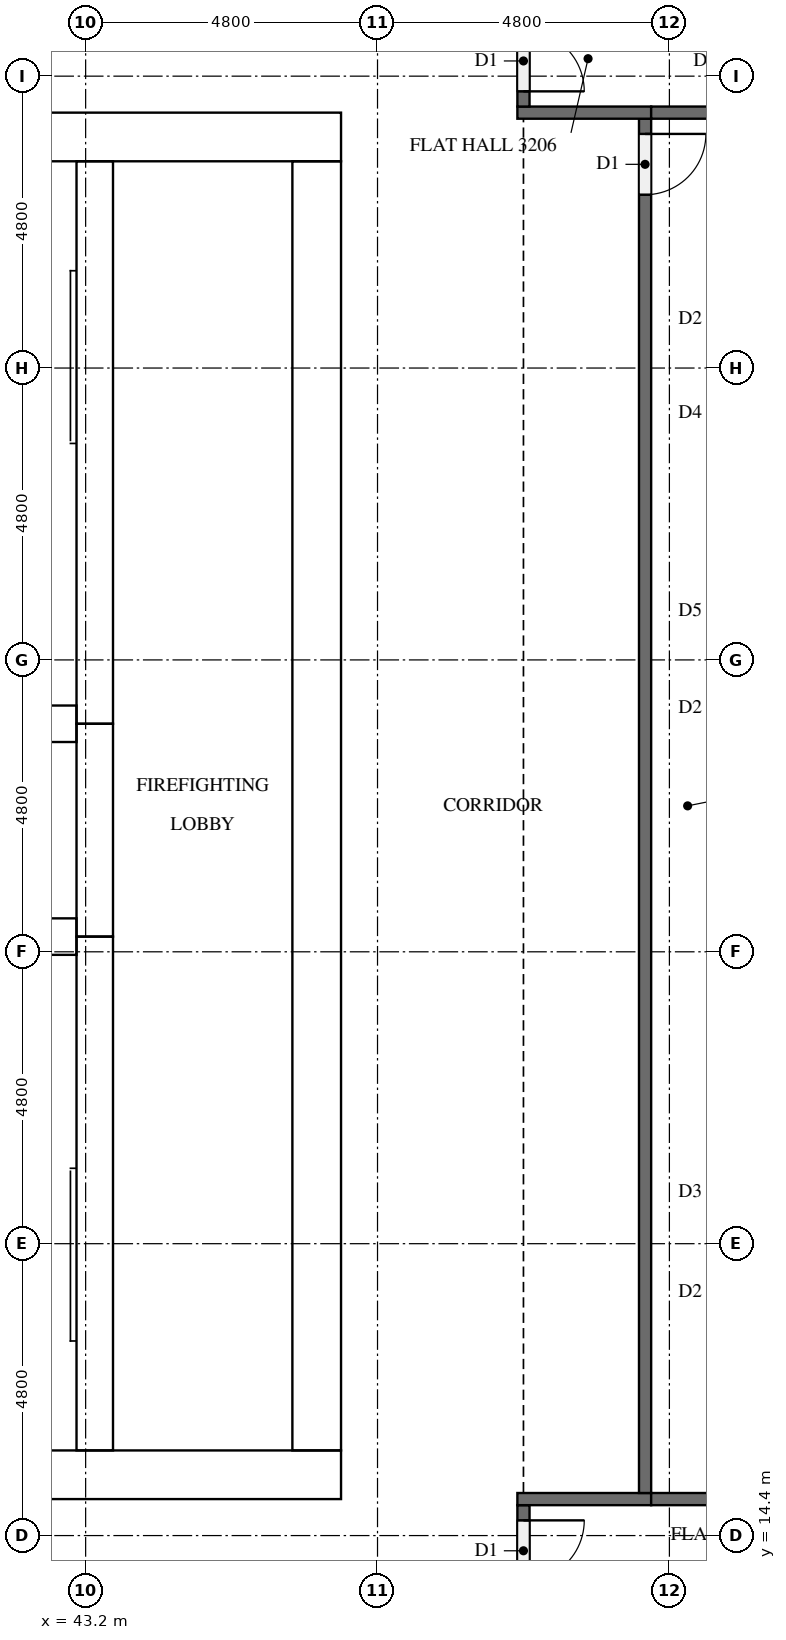
"""IFC4 building model, lengths in metres.
Left out: names, types, materials, properties, quantities, classifications, styles, units other than length and angle.
Written with IfcOpenShell. Run it as: python <this file> out.ifc"""

import sys

from ifc_helpers import new_model, si_unit, direction, frame, frame_2d, origin, place, context, subcontext, project, spatial, rectangle, extrude, element, fill, save


model = new_model("IFC4")
c1 = context("Model", 3, precision=1e-05, world=origin(), true_north=direction((0.0, 1.0)))
c2 = subcontext(c1, "Body", "Model", "MODEL_VIEW")
j1 = project(units=[si_unit("LENGTHUNIT", "METRE"), si_unit("PLANEANGLEUNIT", "RADIAN")], contexts=[c1])
p1 = place(None, origin())
s1 = spatial("IfcSite", under=j1, at=p1, CompositionType="ELEMENT")
p2 = place(p1, origin())
s2 = spatial("IfcBuilding", under=s1, at=p2, CompositionType="ELEMENT")
p3 = place(p2, frame((0.0, 0.0, 126.1)))
s3 = spatial("IfcBuildingStorey", under=s2, at=p3, CompositionType="ELEMENT", Elevation=126.1)
p4 = place(p3, frame((15.0, 15.4, 0.0), z_axis=(0.0, 0.0, 1.0), x_axis=(1.0, 0.0, 0.0)))
e1 = element("IfcWall", 1, at=p4, inside=s3, PredefinedType="SHEAR", context=c2, shape_type="SweptSolid", body=[
    extrude(rectangle(XDim=32.4, YDim=0.8, at=frame_2d((16.2, 0.0))), origin(), (0.0, 0.0, 1.0), 3.2),
])
p5 = place(p4, frame((15.3, 0.0, 0.0)))
e2 = element("IfcOpeningElement", 2, at=p5, cuts=e1, PredefinedType="OPENING", context=c2, shape_type="SweptSolid", body=[
    extrude(rectangle(XDim=1.8, YDim=2.1, at=frame_2d((0.9, 1.05))), frame((0.0, 0.41, 0.0), z_axis=(0.0, -1.0, 0.0), x_axis=(1.0, 0.0, 0.0)), (0.0, 0.0, 1.0), 0.82),
])
p6 = place(p3, frame((15.0, 37.4, 0.0), z_axis=(0.0, 0.0, 1.0), x_axis=(1.0, 0.0, 0.0)))
e3 = element("IfcWall", 3, at=p6, inside=s3, PredefinedType="SHEAR", context=c2, shape_type="SweptSolid", body=[
    extrude(rectangle(XDim=32.4, YDim=0.8, at=frame_2d((16.2, 0.0))), origin(), (0.0, 0.0, 1.0), 3.2),
])
p7 = place(p6, frame((15.3, 0.0, 0.0)))
e4 = element("IfcOpeningElement", 4, at=p7, cuts=e3, PredefinedType="OPENING", context=c2, shape_type="SweptSolid", body=[
    extrude(rectangle(XDim=1.8, YDim=2.1, at=frame_2d((0.9, 1.05))), frame((0.0, 0.41, 0.0), z_axis=(0.0, -1.0, 0.0), x_axis=(1.0, 0.0, 0.0)), (0.0, 0.0, 1.0), 0.82),
])
p8 = place(p6, frame((1.51, 0.0, 0.0)))
e5 = element("IfcOpeningElement", 5, at=p8, cuts=e3, PredefinedType="OPENING", context=c2, shape_type="SweptSolid", body=[
    extrude(rectangle(XDim=1.0, YDim=2.1, at=frame_2d((0.5, 1.05))), frame((0.0, 0.41, 0.0), z_axis=(0.0, -1.0, 0.0), x_axis=(1.0, 0.0, 0.0)), (0.0, 0.0, 1.0), 0.82),
])
p9 = place(p6, frame((5.11, 0.0, 0.0)))
e6 = element("IfcOpeningElement", 6, at=p9, cuts=e3, PredefinedType="OPENING", context=c2, shape_type="SweptSolid", body=[
    extrude(rectangle(XDim=1.0, YDim=2.1, at=frame_2d((0.5, 1.05))), frame((0.0, 0.41, 0.0), z_axis=(0.0, -1.0, 0.0), x_axis=(1.0, 0.0, 0.0)), (0.0, 0.0, 1.0), 0.82),
])
p10 = place(p3, frame((47.0, 15.8, 0.0), z_axis=(0.0, 0.0, 1.0), x_axis=(0.0, 1.0, 0.0)))
e7 = element("IfcWall", 7, at=p10, inside=s3, PredefinedType="SHEAR", context=c2, shape_type="SweptSolid", body=[
    extrude(rectangle(XDim=21.2, YDim=0.8, at=frame_2d((10.6, 0.0))), origin(), (0.0, 0.0, 1.0), 3.2),
])
p11 = place(p10, frame((10.3, 0.0, 0.0)))
e8 = element("IfcOpeningElement", 8, at=p11, cuts=e7, PredefinedType="OPENING", context=c2, shape_type="SweptSolid", body=[
    extrude(rectangle(XDim=1.2, YDim=2.1, at=frame_2d((0.6, 1.05))), frame((0.0, 0.41, 0.0), z_axis=(0.0, -1.0, 0.0), x_axis=(1.0, 0.0, 0.0)), (0.0, 0.0, 1.0), 0.82),
])
p12 = place(p3, frame((43.35, 15.8, 0.0), z_axis=(0.0, 0.0, 1.0), x_axis=(0.0, 1.0, 0.0)))
e9 = element("IfcWall", 9, at=p12, inside=s3, PredefinedType="SHEAR", context=c2, shape_type="SweptSolid", body=[
    extrude(rectangle(XDim=8.45, YDim=0.6, at=frame_2d((4.225, 0.0))), origin(), (0.0, 0.0, 1.0), 3.2),
])
p13 = place(p12, frame((0.4, 0.0, 0.0)))
e10 = element("IfcOpeningElement", 10, at=p13, cuts=e9, PredefinedType="OPENING", context=c2, shape_type="SweptSolid", body=[
    extrude(rectangle(XDim=1.2, YDim=2.1, at=frame_2d((0.6, 1.05))), frame((0.0, 0.31, 0.0), z_axis=(0.0, -1.0, 0.0), x_axis=(1.0, 0.0, 0.0)), (0.0, 0.0, 1.0), 0.62),
])
p14 = place(p3, frame((43.35, 24.25, 0.0), z_axis=(0.0, 0.0, 1.0), x_axis=(0.0, 1.0, 0.0)))
e11 = element("IfcWall", 11, at=p14, inside=s3, PredefinedType="SHEAR", context=c2, shape_type="SweptSolid", body=[
    extrude(rectangle(XDim=3.5, YDim=0.6, at=frame_2d((1.75, 0.0))), origin(), (0.0, 0.0, 1.0), 3.2),
])
p15 = place(p14, frame((1.2, 0.0, 0.0)))
e12 = element("IfcOpeningElement", 12, at=p15, cuts=e11, PredefinedType="OPENING", context=c2, shape_type="SweptSolid", body=[
    extrude(rectangle(XDim=1.1, YDim=2.1, at=frame_2d((0.55, 1.05))), frame((0.0, 0.31, 0.0), z_axis=(0.0, -1.0, 0.0), x_axis=(1.0, 0.0, 0.0)), (0.0, 0.0, 1.0), 0.62),
])
p16 = place(p3, frame((43.35, 27.75, 0.0), z_axis=(0.0, 0.0, 1.0), x_axis=(0.0, 1.0, 0.0)))
e13 = element("IfcWall", 13, at=p16, inside=s3, PredefinedType="SHEAR", context=c2, shape_type="SweptSolid", body=[
    extrude(rectangle(XDim=9.25, YDim=0.6, at=frame_2d((4.625, 0.0))), origin(), (0.0, 0.0, 1.0), 3.2),
])
p17 = place(p16, frame((7.65, 0.0, 0.0)))
e14 = element("IfcOpeningElement", 14, at=p17, cuts=e13, PredefinedType="OPENING", context=c2, shape_type="SweptSolid", body=[
    extrude(rectangle(XDim=1.2, YDim=2.1, at=frame_2d((0.6, 1.05))), frame((0.0, 0.31, 0.0), z_axis=(0.0, -1.0, 0.0), x_axis=(1.0, 0.0, 0.0)), (0.0, 0.0, 1.0), 0.62),
])
for number, where, z_axis, x_axis in (
    (15, (39.6, 24.25, 0.0), (0.0, 0.0, 1.0), (1.0, 0.0, 0.0)),
    (16, (39.6, 27.75, 0.0), (0.0, 0.0, 1.0), (1.0, 0.0, 0.0)),
):
    element("IfcWall", number, at=place(p3, frame(where, z_axis=z_axis, x_axis=x_axis)), inside=s3, PredefinedType="SHEAR", context=c2, shape_type="SweptSolid", body=[
        extrude(rectangle(XDim=3.45, YDim=0.6, at=frame_2d((1.725, 0.0))), origin(), (0.0, 0.0, 1.0), 3.2),
    ])
p18 = place(p3, frame((50.4, 14.9, 0.0), z_axis=(0.0, 0.0, 1.0), x_axis=(0.0, -1.0, 0.0)))
e17 = element("IfcWall", 17, at=p18, inside=s3, PredefinedType="PARTITIONING", context=c2, shape_type="SweptSolid", body=[
    extrude(rectangle(XDim=2.8, YDim=0.2, at=frame_2d((1.4, 0.0))), origin(), (0.0, 0.0, 1.0), 3.2),
])
p19 = place(p18, frame((0.25, 0.0, 0.0)))
e18 = element("IfcOpeningElement", 18, at=p19, cuts=e17, PredefinedType="OPENING", context=c2, shape_type="SweptSolid", body=[
    extrude(rectangle(XDim=1.0, YDim=2.1, at=frame_2d((0.5, 1.05))), frame((0.0, 0.11, 0.0), z_axis=(0.0, -1.0, 0.0), x_axis=(1.0, 0.0, 0.0)), (0.0, 0.0, 1.0), 0.22),
])
p20 = place(p3, frame((50.3, 15.0, 0.0), z_axis=(0.0, 0.0, 1.0), x_axis=(1.0, 0.0, 0.0)))
e19 = element("IfcWall", 19, at=p20, inside=s3, PredefinedType="PARTITIONING", context=c2, shape_type="SweptSolid", body=[
    extrude(rectangle(XDim=2.2, YDim=0.2, at=frame_2d((1.1, 0.0))), origin(), (0.0, 0.0, 1.0), 3.2),
])
p21 = place(p3, frame((52.4, 37.7, 0.0), z_axis=(0.0, 0.0, 1.0), x_axis=(0.0, -1.0, 0.0)))
e20 = element("IfcWall", 20, at=p21, inside=s3, PredefinedType="PARTITIONING", context=c2, shape_type="SweptSolid", body=[
    extrude(rectangle(XDim=22.6, YDim=0.2, at=frame_2d((11.3, 0.0))), origin(), (0.0, 0.0, 1.0), 3.2),
])
p22 = place(p21, frame((0.25, 0.0, 0.0)))
e21 = element("IfcOpeningElement", 21, at=p22, cuts=e20, PredefinedType="OPENING", context=c2, shape_type="SweptSolid", body=[
    extrude(rectangle(XDim=1.0, YDim=2.1, at=frame_2d((0.5, 1.05))), frame((0.0, 0.11, 0.0), z_axis=(0.0, -1.0, 0.0), x_axis=(1.0, 0.0, 0.0)), (0.0, 0.0, 1.0), 0.22),
])
p23 = place(p3, frame((52.5, 37.8, 0.0), z_axis=(0.0, 0.0, 1.0), x_axis=(-1.0, 0.0, 0.0)))
e22 = element("IfcWall", 22, at=p23, inside=s3, PredefinedType="PARTITIONING", context=c2, shape_type="SweptSolid", body=[
    extrude(rectangle(XDim=2.2, YDim=0.2, at=frame_2d((1.1, 0.0))), origin(), (0.0, 0.0, 1.0), 3.2),
])
p24 = place(p3, frame((50.4, 40.7, 0.0), z_axis=(0.0, 0.0, 1.0), x_axis=(0.0, -1.0, 0.0)))
e23 = element("IfcWall", 23, at=p24, inside=s3, PredefinedType="PARTITIONING", context=c2, shape_type="SweptSolid", body=[
    extrude(rectangle(XDim=2.8, YDim=0.2, at=frame_2d((1.4, 0.0))), origin(), (0.0, 0.0, 1.0), 3.2),
])
p25 = place(p24, frame((1.55, 0.0, 0.0)))
e24 = element("IfcOpeningElement", 24, at=p25, cuts=e23, PredefinedType="OPENING", context=c2, shape_type="SweptSolid", body=[
    extrude(rectangle(XDim=1.0, YDim=2.1, at=frame_2d((0.5, 1.05))), frame((0.0, 0.11, 0.0), z_axis=(0.0, -1.0, 0.0), x_axis=(1.0, 0.0, 0.0)), (0.0, 0.0, 1.0), 0.22),
])
p26 = place(p3, frame((52.5, 15.0, 0.0), z_axis=(0.0, 0.0, 1.0), x_axis=(1.0, 0.0, 0.0)))
e25 = element("IfcWall", 25, at=p26, inside=s3, PredefinedType="PARTITIONING", context=c2, shape_type="SweptSolid", body=[
    extrude(rectangle(XDim=5.0, YDim=0.2, at=frame_2d((2.5, 0.0))), origin(), (0.0, 0.0, 1.0), 3.2),
])
p27 = place(p3, frame((52.5, 37.8, 0.0), z_axis=(0.0, 0.0, 1.0), x_axis=(1.0, 0.0, 0.0)))
e26 = element("IfcWall", 26, at=p27, inside=s3, PredefinedType="PARTITIONING", context=c2, shape_type="SweptSolid", body=[
    extrude(rectangle(XDim=4.725, YDim=0.2, at=frame_2d((2.363, 0.0))), origin(), (0.0, 0.0, 1.0), 3.2),
])
p28 = place(p15, origin())
e27 = element("IfcDoor", 27, at=p28, inside=s3, OperationType="DOUBLE_DOOR_SLIDING", PredefinedType="DOOR", context=c2, shape_type="SweptSolid", body=[
    extrude(rectangle(XDim=1.1, YDim=2.1, at=frame_2d((0.55, 1.05))), frame((0.0, 0.025, 0.0), z_axis=(0.0, -1.0, 0.0), x_axis=(1.0, 0.0, 0.0)), (0.0, 0.0, 1.0), 0.05),
])
fill(e12, e27)
p29 = place(p13, origin())
e28 = element("IfcDoor", 28, at=p29, inside=s3, OperationType="SINGLE_SWING_LEFT", PredefinedType="DOOR", context=c2, shape_type="SweptSolid", body=[
    extrude(rectangle(XDim=1.2, YDim=2.1, at=frame_2d((0.6, 1.05))), frame((0.0, 0.025, 0.0), z_axis=(0.0, -1.0, 0.0), x_axis=(1.0, 0.0, 0.0)), (0.0, 0.0, 1.0), 0.05),
])
fill(e10, e28)
p30 = place(p17, origin())
e29 = element("IfcDoor", 29, at=p30, inside=s3, OperationType="SINGLE_SWING_RIGHT", PredefinedType="DOOR", context=c2, shape_type="SweptSolid", body=[
    extrude(rectangle(XDim=1.2, YDim=2.1, at=frame_2d((0.6, 1.05))), frame((0.0, 0.025, 0.0), z_axis=(0.0, -1.0, 0.0), x_axis=(1.0, 0.0, 0.0)), (0.0, 0.0, 1.0), 0.05),
])
fill(e14, e29)
p31 = place(p11, origin())
e30 = element("IfcDoor", 30, at=p31, inside=s3, OperationType="SINGLE_SWING_RIGHT", PredefinedType="DOOR", context=c2, shape_type="SweptSolid", body=[
    extrude(rectangle(XDim=1.2, YDim=2.1, at=frame_2d((0.6, 1.05))), frame((0.0, 0.025, 0.0), z_axis=(0.0, -1.0, 0.0), x_axis=(1.0, 0.0, 0.0)), (0.0, 0.0, 1.0), 0.05),
])
fill(e8, e30)
p32 = place(p19, origin())
e31 = element("IfcDoor", 31, at=p32, inside=s3, OperationType="SINGLE_SWING_LEFT", PredefinedType="DOOR", context=c2, shape_type="SweptSolid", body=[
    extrude(rectangle(XDim=1.0, YDim=2.1, at=frame_2d((0.5, 1.05))), frame((0.0, 0.025, 0.0), z_axis=(0.0, -1.0, 0.0), x_axis=(1.0, 0.0, 0.0)), (0.0, 0.0, 1.0), 0.05),
])
fill(e18, e31)
p33 = place(p22, origin())
e32 = element("IfcDoor", 32, at=p33, inside=s3, OperationType="SINGLE_SWING_LEFT", PredefinedType="DOOR", context=c2, shape_type="SweptSolid", body=[
    extrude(rectangle(XDim=1.0, YDim=2.1, at=frame_2d((0.5, 1.05))), frame((0.0, 0.025, 0.0), z_axis=(0.0, -1.0, 0.0), x_axis=(1.0, 0.0, 0.0)), (0.0, 0.0, 1.0), 0.05),
])
fill(e21, e32)
p34 = place(p25, origin())
e33 = element("IfcDoor", 33, at=p34, inside=s3, OperationType="SINGLE_SWING_RIGHT", PredefinedType="DOOR", context=c2, shape_type="SweptSolid", body=[
    extrude(rectangle(XDim=1.0, YDim=2.1, at=frame_2d((0.5, 1.05))), frame((0.0, 0.025, 0.0), z_axis=(0.0, -1.0, 0.0), x_axis=(1.0, 0.0, 0.0)), (0.0, 0.0, 1.0), 0.05),
])
fill(e24, e33)
save(model, sys.argv[1])
